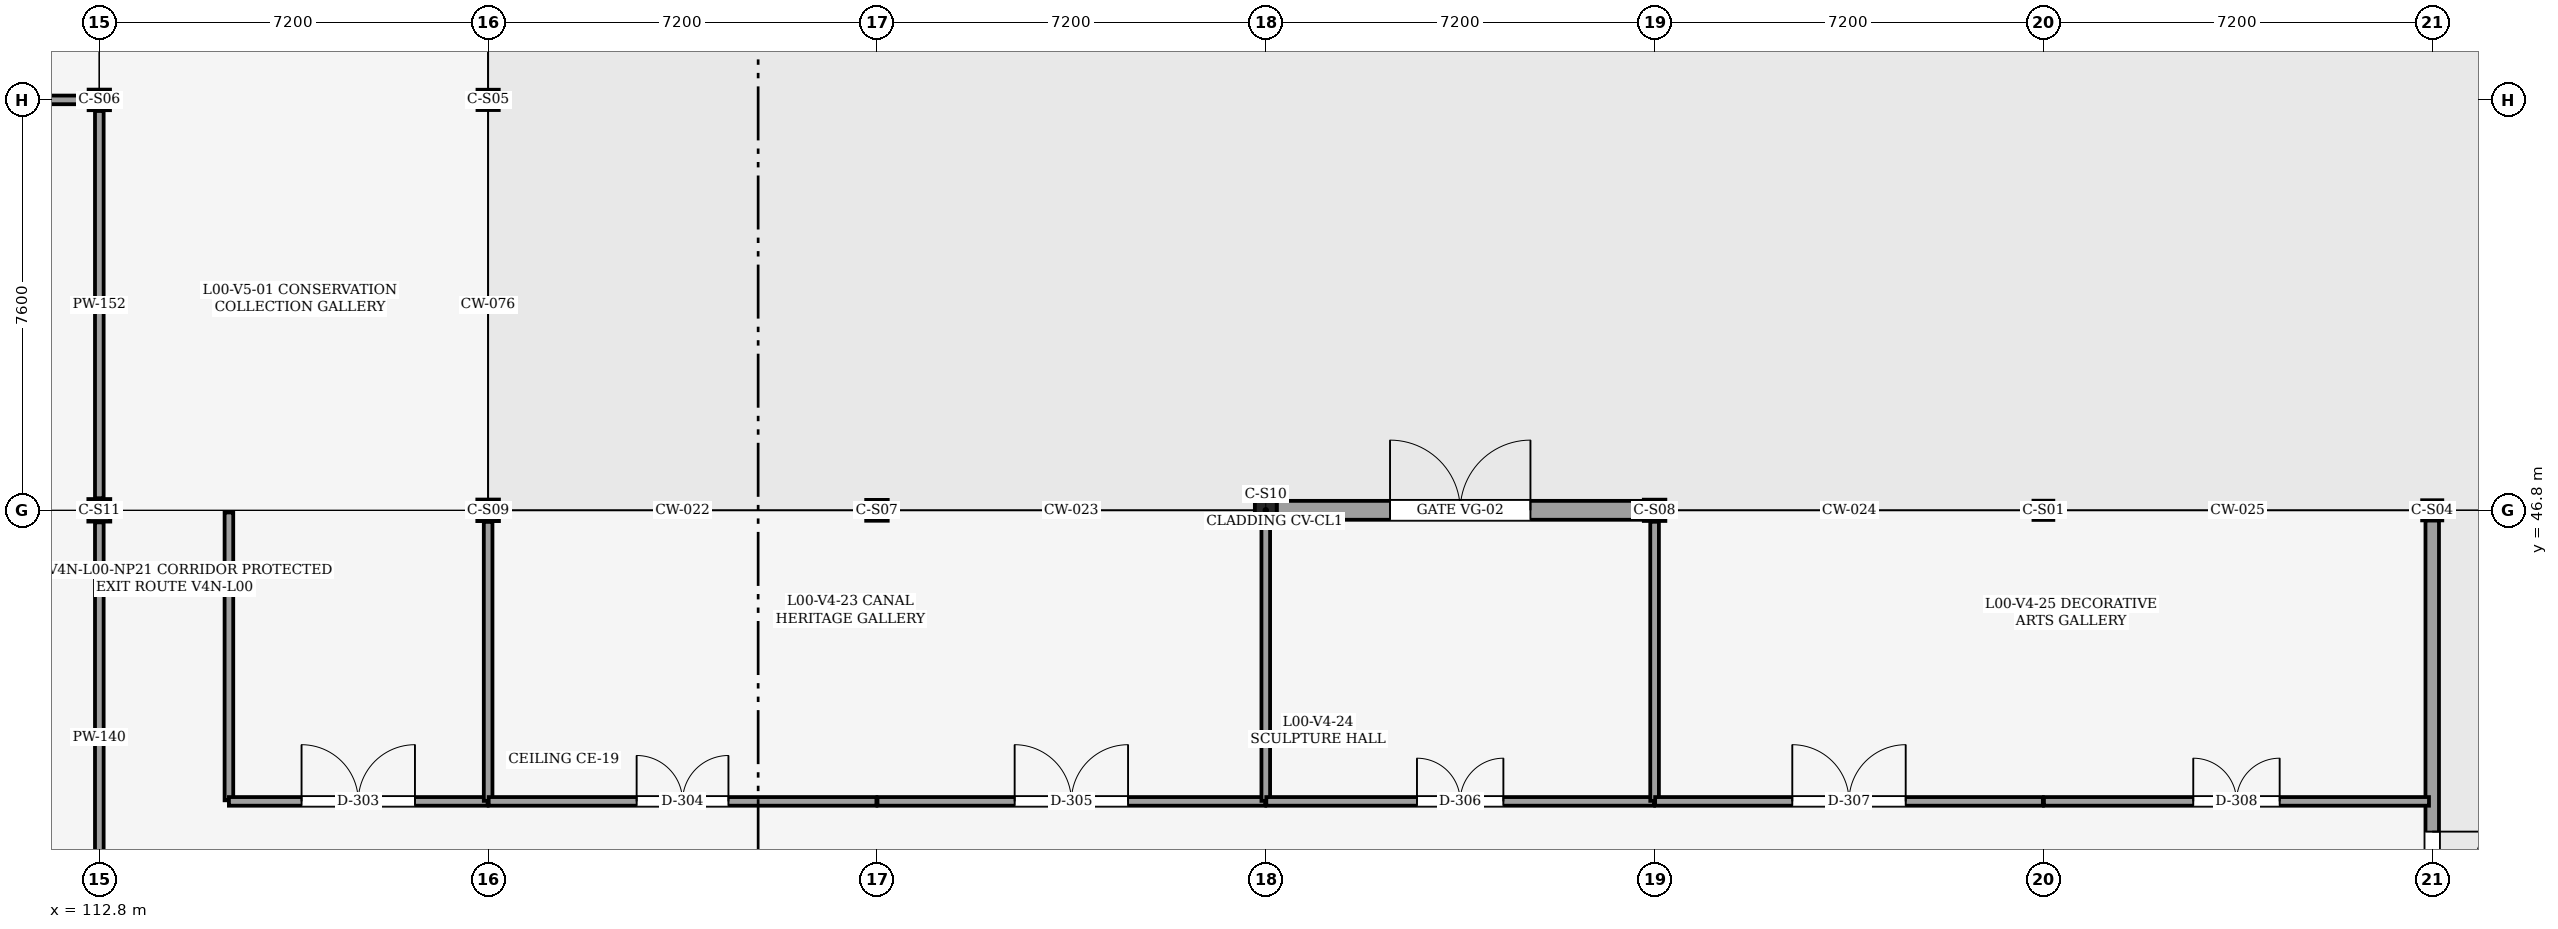
"""IFC4 building model, lengths in metres.
Left out: names, types, materials, properties, quantities, classifications, styles, units other than length and angle.
Written with IfcOpenShell. Run it as: python <this file> out.ifc"""

import sys

from ifc_helpers import new_model, si_unit, direction, frame, frame_2d, origin, origin_2d, place, context, subcontext, project, spatial, rectangle, i_section, extrude, element, fill, save


model = new_model("IFC4")
c1 = context("Model", 3, precision=1e-05, world=origin(), true_north=direction((0.0, 1.0)))
c2 = subcontext(c1, "Body", "Model", "MODEL_VIEW")
j1 = project(units=[si_unit("LENGTHUNIT", "METRE"), si_unit("PLANEANGLEUNIT", "RADIAN")], contexts=[c1])
p1 = place(None, origin())
s1 = spatial("IfcSite", under=j1, at=p1, CompositionType="ELEMENT")
p2 = place(p1, origin())
s2 = spatial("IfcBuilding", under=s1, at=p2, CompositionType="ELEMENT")
p3 = place(p2, origin())
s3 = spatial("IfcBuildingStorey", under=s2, at=p3, CompositionType="ELEMENT", Elevation=0.0)
p4 = place(p3, frame((112.8, 46.8, 0.0), z_axis=(0.0, 0.0, 1.0), x_axis=(1.0, 0.0, 0.0)))
e1 = element("IfcColumn", 1, at=p4, inside=s3, PredefinedType="COLUMN", context=c2, shape_type="SweptSolid", body=[
    extrude(i_section(OverallWidth=0.406, OverallDepth=0.417, WebThickness=0.03, FlangeThickness=0.048, FilletRadius=0.025, at=origin_2d()), origin(), (0.0, 0.0, 1.0), 5.4),
])
p5 = place(p3, frame((112.8, 54.4, 0.0), z_axis=(0.0, 0.0, 1.0), x_axis=(1.0, 0.0, 0.0)))
e2 = element("IfcColumn", 2, at=p5, inside=s3, PredefinedType="COLUMN", context=c2, shape_type="SweptSolid", body=[
    extrude(i_section(OverallWidth=0.396, OverallDepth=0.381, WebThickness=0.019, FlangeThickness=0.03, FilletRadius=0.025, at=origin_2d()), origin(), (0.0, 0.0, 1.0), 5.4),
])
p6 = place(p3, frame((120.0, 46.8, 0.0), z_axis=(0.0, 0.0, 1.0), x_axis=(1.0, 0.0, 0.0)))
e3 = element("IfcColumn", 3, at=p6, inside=s3, PredefinedType="COLUMN", context=c2, shape_type="SweptSolid", body=[
    extrude(i_section(OverallWidth=0.401, OverallDepth=0.399, WebThickness=0.025, FlangeThickness=0.04, FilletRadius=0.025, at=origin_2d()), origin(), (0.0, 0.0, 1.0), 5.4),
])
p7 = place(p3, frame((120.0, 54.4, 0.0), z_axis=(0.0, 0.0, 1.0), x_axis=(1.0, 0.0, 0.0)))
e4 = element("IfcColumn", 4, at=p7, inside=s3, PredefinedType="COLUMN", context=c2, shape_type="SweptSolid", body=[
    extrude(i_section(OverallWidth=0.394, OverallDepth=0.376, WebThickness=0.017, FlangeThickness=0.028, FilletRadius=0.025, at=origin_2d()), origin(), (0.0, 0.0, 1.0), 5.4),
])
p8 = place(p3, frame((127.2, 46.8, 0.0), z_axis=(0.0, 0.0, 1.0), x_axis=(1.0, 0.0, 0.0)))
e5 = element("IfcColumn", 5, at=p8, inside=s3, PredefinedType="COLUMN", context=c2, shape_type="SweptSolid", body=[
    extrude(i_section(OverallWidth=0.399, OverallDepth=0.386, WebThickness=0.021, FlangeThickness=0.033, FilletRadius=0.025, at=origin_2d()), origin(), (0.0, 0.0, 1.0), 5.4),
])
p9 = place(p3, frame((134.4, 46.8, 0.0), z_axis=(0.0, 0.0, 1.0), x_axis=(1.0, 0.0, 0.0)))
e6 = element("IfcColumn", 6, at=p9, inside=s3, PredefinedType="COLUMN", context=c2, shape_type="SweptSolid", body=[
    extrude(i_section(OverallWidth=0.404, OverallDepth=0.406, WebThickness=0.027, FlangeThickness=0.044, FilletRadius=0.025, at=origin_2d()), origin(), (0.0, 0.0, 1.0), 5.4),
])
p10 = place(p3, frame((141.6, 46.8, 0.0), z_axis=(0.0, 0.0, 1.0), x_axis=(1.0, 0.0, 0.0)))
e7 = element("IfcColumn", 7, at=p10, inside=s3, PredefinedType="COLUMN", context=c2, shape_type="SweptSolid", body=[
    extrude(i_section(OverallWidth=0.399, OverallDepth=0.394, WebThickness=0.023, FlangeThickness=0.037, FilletRadius=0.025, at=origin_2d()), origin(), (0.0, 0.0, 1.0), 5.4),
])
p11 = place(p3, frame((148.8, 46.8, 0.0), z_axis=(0.0, 0.0, 1.0), x_axis=(1.0, 0.0, 0.0)))
e8 = element("IfcColumn", 8, at=p11, inside=s3, PredefinedType="COLUMN", context=c2, shape_type="SweptSolid", body=[
    extrude(i_section(OverallWidth=0.368, OverallDepth=0.356, WebThickness=0.011, FlangeThickness=0.018, FilletRadius=0.025, at=origin_2d()), origin(), (0.0, 0.0, 1.0), 5.4),
])
p12 = place(p3, frame((156.0, 46.8, 0.0), z_axis=(0.0, 0.0, 1.0), x_axis=(1.0, 0.0, 0.0)))
e9 = element("IfcColumn", 9, at=p12, inside=s3, PredefinedType="COLUMN", context=c2, shape_type="SweptSolid", body=[
    extrude(i_section(OverallWidth=0.373, OverallDepth=0.373, WebThickness=0.016, FlangeThickness=0.026, FilletRadius=0.025, at=origin_2d()), origin(), (0.0, 0.0, 1.0), 5.4),
])
p13 = place(p3, frame((134.602, 46.8, 0.0), z_axis=(0.0, 0.0, 1.0), x_axis=(1.0, 0.0, 0.0)))
e10 = element("IfcWall", 10, at=p13, inside=s3, PredefinedType="SOLIDWALL", context=c2, shape_type="SweptSolid", body=[
    extrude(rectangle(XDim=6.798, YDim=0.35, at=frame_2d((3.399, 0.0))), origin(), (0.0, 0.0, 1.0), 4.591),
])
p14 = place(p13, frame((2.099, 0.0, 0.0)))
e11 = element("IfcOpeningElement", 11, at=p14, cuts=e10, PredefinedType="OPENING", context=c2, shape_type="SweptSolid", body=[
    extrude(rectangle(XDim=2.6, YDim=2.4, at=frame_2d((1.3, 1.2))), frame((0.0, 0.185, 0.0), z_axis=(0.0, -1.0, 0.0), x_axis=(1.0, 0.0, 0.0)), (0.0, 0.0, 1.0), 0.371),
])
p15 = place(p3, frame((156.0, 46.614, 0.0), z_axis=(0.0, 0.0, 1.0), x_axis=(0.0, -1.0, 0.0)))
e12 = element("IfcWall", 12, at=p15, inside=s3, PredefinedType="SOLIDWALL", context=c2, shape_type="SweptSolid", body=[
    extrude(rectangle(XDim=8.03, YDim=0.25, at=frame_2d((4.015, 0.0))), origin(), (0.0, 0.0, 1.0), 4.447),
])
p16 = place(p15, frame((5.763, 0.0, 0.0)))
e13 = element("IfcOpeningElement", 13, at=p16, cuts=e12, PredefinedType="OPENING", context=c2, shape_type="SweptSolid", body=[
    extrude(rectangle(XDim=1.8, YDim=2.2, at=frame_2d((0.9, 1.1))), frame((0.0, 0.135, 0.0), z_axis=(0.0, -1.0, 0.0), x_axis=(1.0, 0.0, 0.0)), (0.0, 0.0, 1.0), 0.271),
])
p17 = place(p3, frame((112.8, 38.618, 0.0), z_axis=(0.0, 0.0, 1.0), x_axis=(0.0, 1.0, 0.0)))
e14 = element("IfcWall", 14, at=p17, inside=s3, PredefinedType="PARTITIONING", context=c2, shape_type="SweptSolid", body=[
    extrude(rectangle(XDim=7.958, YDim=0.16, at=frame_2d((3.979, 0.0))), origin(), (0.0, 0.0, 1.0), 4.264),
])
p18 = place(p3, frame((104.602, 54.4, 0.0), z_axis=(0.0, 0.0, 1.0), x_axis=(1.0, 0.0, 0.0)))
e15 = element("IfcWall", 15, at=p18, inside=s3, PredefinedType="PARTITIONING", context=c2, shape_type="SweptSolid", body=[
    extrude(rectangle(XDim=7.985, YDim=0.16, at=frame_2d((3.993, 0.0))), origin(), (0.0, 0.0, 1.0), 4.508),
])
p19 = place(p18, frame((3.043, 0.0, 0.0)))
e16 = element("IfcOpeningElement", 16, at=p19, cuts=e15, PredefinedType="OPENING", context=c2, shape_type="SweptSolid", body=[
    extrude(rectangle(XDim=1.9, YDim=2.45, at=frame_2d((0.95, 1.225))), frame((0.0, 0.09, 0.0), z_axis=(0.0, -1.0, 0.0), x_axis=(1.0, 0.0, 0.0)), (0.0, 0.0, 1.0), 0.18),
])
p20 = place(p3, frame((112.8, 47.023, 0.0), z_axis=(0.0, 0.0, 1.0), x_axis=(0.0, 1.0, 0.0)))
e17 = element("IfcWall", 17, at=p20, inside=s3, PredefinedType="PARTITIONING", context=c2, shape_type="SweptSolid", body=[
    extrude(rectangle(XDim=7.171, YDim=0.16, at=frame_2d((3.585, 0.0))), origin(), (0.0, 0.0, 1.0), 4.587),
])
p21 = place(p3, frame((115.2, 41.43, 0.0), z_axis=(0.0, 0.0, 1.0), x_axis=(0.0, 1.0, 0.0)))
e18 = element("IfcWall", 18, at=p21, inside=s3, PredefinedType="PARTITIONING", context=c2, shape_type="SweptSolid", body=[
    extrude(rectangle(XDim=5.33, YDim=0.16, at=frame_2d((2.665, 0.0))), origin(), (0.0, 0.0, 1.0), 5.14),
])
p22 = place(p3, frame((115.2, 41.41, 0.0), z_axis=(0.0, 0.0, 1.0), x_axis=(1.0, 0.0, 0.0)))
e19 = element("IfcWall", 19, at=p22, inside=s3, PredefinedType="PARTITIONING", context=c2, shape_type="SweptSolid", body=[
    extrude(rectangle(XDim=4.79, YDim=0.16, at=frame_2d((2.395, 0.0))), origin(), (0.0, 0.0, 1.0), 5.14),
])
p23 = place(p22, frame((1.345, 0.0, 0.0)))
e20 = element("IfcOpeningElement", 20, at=p23, cuts=e19, PredefinedType="OPENING", context=c2, shape_type="SweptSolid", body=[
    extrude(rectangle(XDim=2.1, YDim=2.5, at=frame_2d((1.05, 1.25))), frame((0.0, 0.09, 0.0), z_axis=(0.0, -1.0, 0.0), x_axis=(1.0, 0.0, 0.0)), (0.0, 0.0, 1.0), 0.18),
])
p24 = place(p3, frame((120.0, 41.42, 0.0), z_axis=(0.0, 0.0, 1.0), x_axis=(0.0, 1.0, 0.0)))
e21 = element("IfcWall", 21, at=p24, inside=s3, PredefinedType="PARTITIONING", context=c2, shape_type="SweptSolid", body=[
    extrude(rectangle(XDim=5.166, YDim=0.16, at=frame_2d((2.583, 0.0))), origin(), (0.0, 0.0, 1.0), 4.193),
])
p25 = place(p3, frame((120.01, 41.41, 0.0), z_axis=(0.0, 0.0, 1.0), x_axis=(1.0, 0.0, 0.0)))
e22 = element("IfcWall", 22, at=p25, inside=s3, PredefinedType="PARTITIONING", context=c2, shape_type="SweptSolid", body=[
    extrude(rectangle(XDim=7.18, YDim=0.16, at=frame_2d((3.59, 0.0))), origin(), (0.0, 0.0, 1.0), 5.14),
])
p26 = place(p25, frame((2.74, 0.0, 0.0)))
e23 = element("IfcOpeningElement", 23, at=p26, cuts=e22, PredefinedType="OPENING", context=c2, shape_type="SweptSolid", body=[
    extrude(rectangle(XDim=1.7, YDim=2.4, at=frame_2d((0.85, 1.2))), frame((0.0, 0.09, 0.0), z_axis=(0.0, -1.0, 0.0), x_axis=(1.0, 0.0, 0.0)), (0.0, 0.0, 1.0), 0.18),
])
p27 = place(p3, frame((127.21, 41.41, 0.0), z_axis=(0.0, 0.0, 1.0), x_axis=(1.0, 0.0, 0.0)))
e24 = element("IfcWall", 24, at=p27, inside=s3, PredefinedType="PARTITIONING", context=c2, shape_type="SweptSolid", body=[
    extrude(rectangle(XDim=7.18, YDim=0.16, at=frame_2d((3.59, 0.0))), origin(), (0.0, 0.0, 1.0), 5.14),
])
p28 = place(p27, frame((2.54, 0.0, 0.0)))
e25 = element("IfcOpeningElement", 25, at=p28, cuts=e24, PredefinedType="OPENING", context=c2, shape_type="SweptSolid", body=[
    extrude(rectangle(XDim=2.1, YDim=2.5, at=frame_2d((1.05, 1.25))), frame((0.0, 0.09, 0.0), z_axis=(0.0, -1.0, 0.0), x_axis=(1.0, 0.0, 0.0)), (0.0, 0.0, 1.0), 0.18),
])
p29 = place(p3, frame((134.4, 41.42, 0.0), z_axis=(0.0, 0.0, 1.0), x_axis=(0.0, 1.0, 0.0)))
e26 = element("IfcWall", 26, at=p29, inside=s3, PredefinedType="PARTITIONING", context=c2, shape_type="SweptSolid", body=[
    extrude(rectangle(XDim=5.162, YDim=0.16, at=frame_2d((2.581, 0.0))), origin(), (0.0, 0.0, 1.0), 4.368),
])
p30 = place(p3, frame((134.41, 41.41, 0.0), z_axis=(0.0, 0.0, 1.0), x_axis=(1.0, 0.0, 0.0)))
e27 = element("IfcWall", 27, at=p30, inside=s3, PredefinedType="PARTITIONING", context=c2, shape_type="SweptSolid", body=[
    extrude(rectangle(XDim=7.18, YDim=0.16, at=frame_2d((3.59, 0.0))), origin(), (0.0, 0.0, 1.0), 5.14),
])
p31 = place(p30, frame((2.79, 0.0, 0.0)))
e28 = element("IfcOpeningElement", 28, at=p31, cuts=e27, PredefinedType="OPENING", context=c2, shape_type="SweptSolid", body=[
    extrude(rectangle(XDim=1.6, YDim=2.35, at=frame_2d((0.8, 1.175))), frame((0.0, 0.09, 0.0), z_axis=(0.0, -1.0, 0.0), x_axis=(1.0, 0.0, 0.0)), (0.0, 0.0, 1.0), 0.18),
])
p32 = place(p3, frame((141.6, 41.42, 0.0), z_axis=(0.0, 0.0, 1.0), x_axis=(0.0, 1.0, 0.0)))
e29 = element("IfcWall", 29, at=p32, inside=s3, PredefinedType="PARTITIONING", context=c2, shape_type="SweptSolid", body=[
    extrude(rectangle(XDim=5.168, YDim=0.16, at=frame_2d((2.584, 0.0))), origin(), (0.0, 0.0, 1.0), 4.284),
])
p33 = place(p3, frame((141.61, 41.41, 0.0), z_axis=(0.0, 0.0, 1.0), x_axis=(1.0, 0.0, 0.0)))
e30 = element("IfcWall", 30, at=p33, inside=s3, PredefinedType="PARTITIONING", context=c2, shape_type="SweptSolid", body=[
    extrude(rectangle(XDim=7.18, YDim=0.16, at=frame_2d((3.59, 0.0))), origin(), (0.0, 0.0, 1.0), 5.14),
])
p34 = place(p33, frame((2.54, 0.0, 0.0)))
e31 = element("IfcOpeningElement", 31, at=p34, cuts=e30, PredefinedType="OPENING", context=c2, shape_type="SweptSolid", body=[
    extrude(rectangle(XDim=2.1, YDim=2.5, at=frame_2d((1.05, 1.25))), frame((0.0, 0.09, 0.0), z_axis=(0.0, -1.0, 0.0), x_axis=(1.0, 0.0, 0.0)), (0.0, 0.0, 1.0), 0.18),
])
p35 = place(p3, frame((148.81, 41.41, 0.0), z_axis=(0.0, 0.0, 1.0), x_axis=(1.0, 0.0, 0.0)))
e32 = element("IfcWall", 32, at=p35, inside=s3, PredefinedType="PARTITIONING", context=c2, shape_type="SweptSolid", body=[
    extrude(rectangle(XDim=7.13, YDim=0.16, at=frame_2d((3.565, 0.0))), origin(), (0.0, 0.0, 1.0), 5.14),
])
p36 = place(p35, frame((2.765, 0.0, 0.0)))
e33 = element("IfcOpeningElement", 33, at=p36, cuts=e32, PredefinedType="OPENING", context=c2, shape_type="SweptSolid", body=[
    extrude(rectangle(XDim=1.6, YDim=2.35, at=frame_2d((0.8, 1.175))), frame((0.0, 0.09, 0.0), z_axis=(0.0, -1.0, 0.0), x_axis=(1.0, 0.0, 0.0)), (0.0, 0.0, 1.0), 0.18),
])
p37 = place(p14, origin())
e34 = element("IfcDoor", 34, at=p37, inside=s3, OperationType="DOUBLE_DOOR_SINGLE_SWING", PredefinedType="GATE", context=c2, shape_type="SweptSolid", body=[
    extrude(rectangle(XDim=2.6, YDim=2.4, at=frame_2d((1.3, 1.2))), frame((0.0, 0.025, 0.0), z_axis=(0.0, -1.0, 0.0), x_axis=(1.0, 0.0, 0.0)), (0.0, 0.0, 1.0), 0.05),
])
fill(e11, e34)
p38 = place(p16, origin())
e35 = element("IfcDoor", 35, at=p38, inside=s3, OperationType="DOUBLE_DOOR_SINGLE_SWING", PredefinedType="DOOR", context=c2, shape_type="SweptSolid", body=[
    extrude(rectangle(XDim=1.8, YDim=2.2, at=frame_2d((0.9, 1.1))), frame((0.0, 0.025, 0.0), z_axis=(0.0, -1.0, 0.0), x_axis=(1.0, 0.0, 0.0)), (0.0, 0.0, 1.0), 0.05),
])
fill(e13, e35)
p39 = place(p23, origin())
e36 = element("IfcDoor", 36, at=p39, inside=s3, OperationType="DOUBLE_DOOR_SINGLE_SWING", PredefinedType="DOOR", context=c2, shape_type="SweptSolid", body=[
    extrude(rectangle(XDim=2.1, YDim=2.5, at=frame_2d((1.05, 1.25))), frame((0.0, 0.025, 0.0), z_axis=(0.0, -1.0, 0.0), x_axis=(1.0, 0.0, 0.0)), (0.0, 0.0, 1.0), 0.05),
])
fill(e20, e36)
p40 = place(p26, origin())
e37 = element("IfcDoor", 37, at=p40, inside=s3, OperationType="DOUBLE_DOOR_SINGLE_SWING", PredefinedType="DOOR", context=c2, shape_type="SweptSolid", body=[
    extrude(rectangle(XDim=1.7, YDim=2.4, at=frame_2d((0.85, 1.2))), frame((0.0, 0.025, 0.0), z_axis=(0.0, -1.0, 0.0), x_axis=(1.0, 0.0, 0.0)), (0.0, 0.0, 1.0), 0.05),
])
fill(e23, e37)
p41 = place(p28, origin())
e38 = element("IfcDoor", 38, at=p41, inside=s3, OperationType="DOUBLE_DOOR_SINGLE_SWING", PredefinedType="DOOR", context=c2, shape_type="SweptSolid", body=[
    extrude(rectangle(XDim=2.1, YDim=2.5, at=frame_2d((1.05, 1.25))), frame((0.0, 0.025, 0.0), z_axis=(0.0, -1.0, 0.0), x_axis=(1.0, 0.0, 0.0)), (0.0, 0.0, 1.0), 0.05),
])
fill(e25, e38)
p42 = place(p31, origin())
e39 = element("IfcDoor", 39, at=p42, inside=s3, OperationType="DOUBLE_DOOR_SINGLE_SWING", PredefinedType="DOOR", context=c2, shape_type="SweptSolid", body=[
    extrude(rectangle(XDim=1.6, YDim=2.35, at=frame_2d((0.8, 1.175))), frame((0.0, 0.025, 0.0), z_axis=(0.0, -1.0, 0.0), x_axis=(1.0, 0.0, 0.0)), (0.0, 0.0, 1.0), 0.05),
])
fill(e28, e39)
p43 = place(p34, origin())
e40 = element("IfcDoor", 40, at=p43, inside=s3, OperationType="DOUBLE_DOOR_SINGLE_SWING", PredefinedType="DOOR", context=c2, shape_type="SweptSolid", body=[
    extrude(rectangle(XDim=2.1, YDim=2.5, at=frame_2d((1.05, 1.25))), frame((0.0, 0.025, 0.0), z_axis=(0.0, -1.0, 0.0), x_axis=(1.0, 0.0, 0.0)), (0.0, 0.0, 1.0), 0.05),
])
fill(e31, e40)
p44 = place(p36, origin())
e41 = element("IfcDoor", 41, at=p44, inside=s3, OperationType="DOUBLE_DOOR_SINGLE_SWING", PredefinedType="DOOR", context=c2, shape_type="SweptSolid", body=[
    extrude(rectangle(XDim=1.6, YDim=2.35, at=frame_2d((0.8, 1.175))), frame((0.0, 0.025, 0.0), z_axis=(0.0, -1.0, 0.0), x_axis=(1.0, 0.0, 0.0)), (0.0, 0.0, 1.0), 0.05),
])
fill(e33, e41)
save(model, sys.argv[1])
